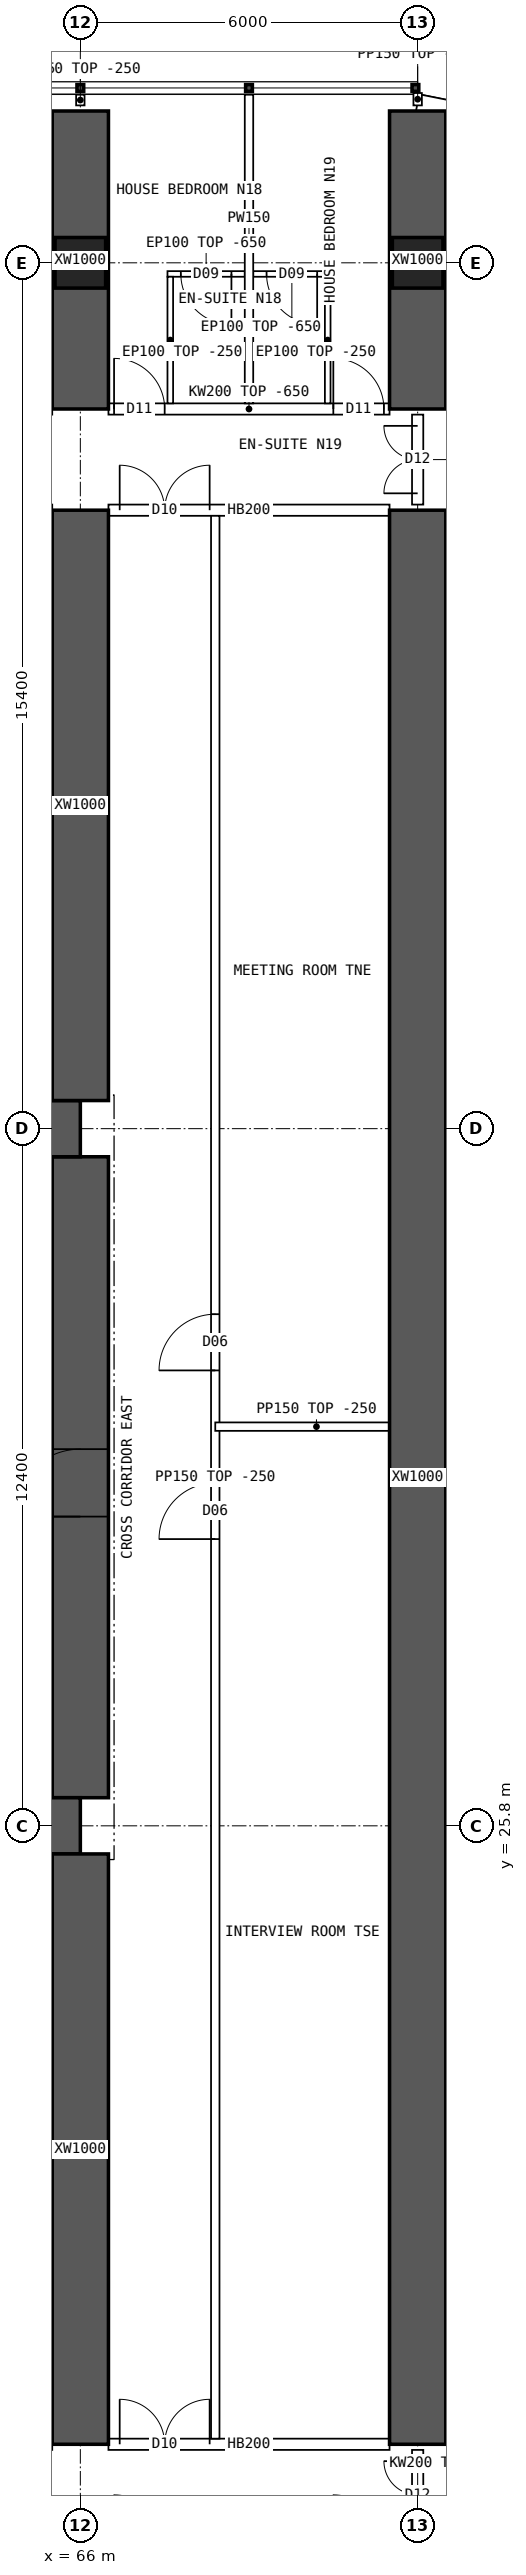
"""IFC4 building model, lengths in metres.
Left out: names, types, materials, properties, quantities, classifications, styles, units other than length and angle.
Written with IfcOpenShell. Run it as: python <this file> out.ifc"""

import sys

from ifc_helpers import new_model, si_unit, direction, frame, frame_2d, origin, origin_2d, place, context, subcontext, project, spatial, polyline, rectangle, hollow_rectangle, outline, extrude, element, fill, save


model = new_model("IFC4")
c1 = context("Model", 3, precision=1e-05, world=origin(), true_north=direction((0.0, 1.0)))
c2 = subcontext(c1, "Body", "Model", "MODEL_VIEW")
j1 = project(units=[si_unit("LENGTHUNIT", "METRE"), si_unit("PLANEANGLEUNIT", "RADIAN")], contexts=[c1])
p1 = place(None, origin())
s1 = spatial("IfcSite", under=j1, at=p1, CompositionType="ELEMENT")
p2 = place(p1, origin())
s2 = spatial("IfcBuilding", under=s1, at=p2, CompositionType="ELEMENT")
p3 = place(p2, frame((0.0, 0.0, 38.95)))
s3 = spatial("IfcBuildingStorey", under=s2, at=p3, CompositionType="ELEMENT", Elevation=38.95)
for number, where, z_axis, x_axis in (
    (1, (66.0, 53.6, 0.0), (0.0, 0.0, 1.0), (1.0, 0.0, 0.0)),
    (2, (72.0, 53.6, 0.0), (0.0, 0.0, 1.0), (1.0, 0.0, 0.0)),
):
    element("IfcColumn", number, at=place(p3, frame(where, z_axis=z_axis, x_axis=x_axis)), inside=s3, PredefinedType="COLUMN", context=c2, shape_type="SweptSolid", body=[
        extrude(hollow_rectangle(XDim=0.9, YDim=0.9, WallThickness=0.09, at=origin_2d()), origin(), (0.0, 0.0, 1.0), 3.75),
    ])
for number, where, z_axis, x_axis in (
    (3, (18.0, 25.8, 0.0), (0.0, 0.0, 1.0), (1.0, 0.0, 0.0)),
    (4, (18.0, 38.2, 0.0), (0.0, 0.0, 1.0), (1.0, 0.0, 0.0)),
):
    element("IfcWall", number, at=place(p3, frame(where, z_axis=z_axis, x_axis=x_axis)), inside=s3, PredefinedType="SHEAR", context=c2, shape_type="SweptSolid", body=[
        extrude(rectangle(XDim=48.0, YDim=1.0, at=frame_2d((24.0, 0.0))), origin(), (0.0, 0.0, 1.0), 3.75),
    ])
p4 = place(p3, frame((66.0, 26.3, 0.0), z_axis=(0.0, 0.0, 1.0), x_axis=(0.0, 1.0, 0.0)))
e5 = element("IfcWall", 5, at=p4, inside=s3, PredefinedType="SHEAR", context=c2, shape_type="SweptSolid", body=[
    extrude(rectangle(XDim=11.4, YDim=1.0, at=frame_2d((5.7, 0.0))), origin(), (0.0, 0.0, 1.0), 3.75),
])
p5 = place(p4, frame((5.0, 0.0, 0.0)))
e6 = element("IfcOpeningElement", 6, at=p5, cuts=e5, PredefinedType="OPENING", context=c2, shape_type="SweptSolid", body=[
    extrude(rectangle(XDim=1.2, YDim=2.1, at=frame_2d((0.6, 1.05))), frame((0.0, 0.51, 0.0), z_axis=(0.0, -1.0, 0.0), x_axis=(1.0, 0.0, 0.0)), (0.0, 0.0, 1.0), 1.02),
])
p6 = place(p3, frame((66.0, 51.0, 0.0), z_axis=(0.0, 0.0, 1.0), x_axis=(0.0, 1.0, 0.0)))
e7 = element("IfcWall", 7, at=p6, inside=s3, PredefinedType="SHEAR", context=c2, shape_type="SweptSolid", body=[
    extrude(rectangle(XDim=5.3, YDim=1.0, at=frame_2d((2.65, 0.0))), origin(), (0.0, 0.0, 1.0), 3.75),
])
for number, where, z_axis, x_axis in (
    (8, (66.0, 14.8, 0.0), (0.0, 0.0, 1.0), (0.0, 1.0, 0.0)),
    (9, (66.0, 38.7, 0.0), (0.0, 0.0, 1.0), (0.0, 1.0, 0.0)),
):
    element("IfcWall", number, at=place(p3, frame(where, z_axis=z_axis, x_axis=x_axis)), inside=s3, PredefinedType="SHEAR", context=c2, shape_type="SweptSolid", body=[
        extrude(rectangle(XDim=10.5, YDim=1.0, at=frame_2d((5.25, 0.0))), origin(), (0.0, 0.0, 1.0), 3.75),
    ])
p7 = place(p3, frame((72.0, 51.0, 0.0), z_axis=(0.0, 0.0, 1.0), x_axis=(0.0, 1.0, 0.0)))
e10 = element("IfcWall", 10, at=p7, inside=s3, PredefinedType="SHEAR", context=c2, shape_type="SweptSolid", body=[
    extrude(rectangle(XDim=5.3, YDim=1.0, at=frame_2d((2.65, 0.0))), origin(), (0.0, 0.0, 1.0), 3.75),
])
p8 = place(p3, frame((72.0, 14.8, 0.0), z_axis=(0.0, 0.0, 1.0), x_axis=(0.0, 1.0, 0.0)))
e11 = element("IfcWall", 11, at=p8, inside=s3, PredefinedType="SHEAR", context=c2, shape_type="SweptSolid", body=[
    extrude(rectangle(XDim=34.4, YDim=1.0, at=frame_2d((17.2, 0.0))), origin(), (0.0, 0.0, 1.0), 3.75),
])
p9 = place(p3, frame((75.157, 55.822, 0.0), z_axis=(0.0, 0.0, 1.0), x_axis=(-0.980787251524, 0.195080412259, 0.0)))
e12 = element("IfcWall", 12, at=p9, inside=s3, PredefinedType="SOLIDWALL", context=c2, shape_type="SweptSolid", body=[
    extrude(outline(polyline([(-0.03, -0.15), (3.249, -0.15), (3.189, 0.15), (0.03, 0.15), (-0.03, -0.15)])), origin(), (0.0, 0.0, 1.0), 3.5),
])
p10 = place(p9, frame((0.909, 0.0, 0.9)))
e13 = element("IfcOpeningElement", 13, at=p10, cuts=e12, PredefinedType="OPENING", context=c2, shape_type="SweptSolid", body=[
    extrude(rectangle(XDim=1.4, YDim=1.8, at=frame_2d((0.7, 0.9))), frame((0.0, 0.16, 0.0), z_axis=(0.0, -1.0, 0.0), x_axis=(1.0, 0.0, 0.0)), (0.0, 0.0, 1.0), 0.32),
])
p11 = place(p3, frame((66.5, 14.8, 0.0), z_axis=(0.0, 0.0, 1.0), x_axis=(1.0, 0.0, 0.0)))
e14 = element("IfcWall", 14, at=p11, inside=s3, PredefinedType="SOLIDWALL", context=c2, shape_type="SweptSolid", body=[
    extrude(rectangle(XDim=5.0, YDim=0.2, at=frame_2d((2.5, 0.0))), origin(), (0.0, 0.0, 1.0), 3.5),
])
p12 = place(p11, frame((0.2, 0.0, 0.0)))
e15 = element("IfcOpeningElement", 15, at=p12, cuts=e14, PredefinedType="OPENING", context=c2, shape_type="SweptSolid", body=[
    extrude(rectangle(XDim=1.6, YDim=2.1, at=frame_2d((0.8, 1.05))), frame((0.0, 0.11, 0.0), z_axis=(0.0, -1.0, 0.0), x_axis=(1.0, 0.0, 0.0)), (0.0, 0.0, 1.0), 0.22),
])
p13 = place(p3, frame((66.5, 51.0, 0.0), z_axis=(0.0, 0.0, 1.0), x_axis=(1.0, 0.0, 0.0)))
e16 = element("IfcWall", 16, at=p13, inside=s3, PredefinedType="SOLIDWALL", context=c2, shape_type="SweptSolid", body=[
    extrude(outline(polyline([(0.0, 0.0), (5.0, 0.0), (5.0, 3.1), (0.0, 3.1), (0.0, 0.0)])), frame((0.0, 0.1, 0.0), z_axis=(0.0, -1.0, 0.0), x_axis=(1.0, 0.0, 0.0)), (0.0, 0.0, 1.0), 0.2),
])
p14 = place(p13, frame((0.1, 0.0, 0.0)))
e17 = element("IfcOpeningElement", 17, at=p14, cuts=e16, PredefinedType="OPENING", context=c2, shape_type="SweptSolid", body=[
    extrude(rectangle(XDim=0.9, YDim=2.1, at=frame_2d((0.45, 1.05))), frame((0.0, 0.11, 0.0), z_axis=(0.0, -1.0, 0.0), x_axis=(1.0, 0.0, 0.0)), (0.0, 0.0, 1.0), 0.22),
])
p15 = place(p13, frame((4.0, 0.0, 0.0)))
e18 = element("IfcOpeningElement", 18, at=p15, cuts=e16, PredefinedType="OPENING", context=c2, shape_type="SweptSolid", body=[
    extrude(rectangle(XDim=0.9, YDim=2.1, at=frame_2d((0.45, 1.05))), frame((0.0, 0.11, 0.0), z_axis=(0.0, -1.0, 0.0), x_axis=(1.0, 0.0, 0.0)), (0.0, 0.0, 1.0), 0.22),
])
p16 = place(p3, frame((66.5, 49.2, 0.0), z_axis=(0.0, 0.0, 1.0), x_axis=(1.0, 0.0, 0.0)))
e19 = element("IfcWall", 19, at=p16, inside=s3, PredefinedType="SOLIDWALL", context=c2, shape_type="SweptSolid", body=[
    extrude(rectangle(XDim=5.0, YDim=0.2, at=frame_2d((2.5, 0.0))), origin(), (0.0, 0.0, 1.0), 3.5),
])
p17 = place(p16, frame((0.2, 0.0, 0.0)))
e20 = element("IfcOpeningElement", 20, at=p17, cuts=e19, PredefinedType="OPENING", context=c2, shape_type="SweptSolid", body=[
    extrude(rectangle(XDim=1.6, YDim=2.1, at=frame_2d((0.8, 1.05))), frame((0.0, 0.11, 0.0), z_axis=(0.0, -1.0, 0.0), x_axis=(1.0, 0.0, 0.0)), (0.0, 0.0, 1.0), 0.22),
])
p18 = place(p3, frame((69.0, 56.59, 0.0), z_axis=(0.0, 0.0, 1.0), x_axis=(0.0, -1.0, 0.0)))
e21 = element("IfcWall", 21, at=p18, inside=s3, PredefinedType="PARTITIONING", context=c2, shape_type="SweptSolid", body=[
    extrude(outline(polyline([(0.0, 0.0), (5.49, 0.0), (5.49, 3.1), (5.442, 3.1), (5.44, 3.5), (3.192, 3.5), (3.19, 3.1), (2.792, 3.1), (2.79, 3.5), (0.0, 3.5), (0.0, 0.0)])), frame((0.0, 0.075, 0.0), z_axis=(0.0, -1.0, 0.0), x_axis=(1.0, 0.0, 0.0)), (0.0, 0.0, 1.0), 0.15),
])
p19 = place(p3, frame((67.55, 53.402, 0.0), z_axis=(0.0, 0.0, 1.0), x_axis=(1.0, 0.0, 0.0)))
e22 = element("IfcWall", 22, at=p19, inside=s3, PredefinedType="PARTITIONING", context=c2, shape_type="SweptSolid", body=[
    extrude(outline(polyline([(0.0, 0.0), (1.375, 0.0), (1.375, 3.1), (0.0, 3.1), (0.0, 0.0)])), frame((0.0, 0.05, 0.0), z_axis=(0.0, -1.0, 0.0), x_axis=(1.0, 0.0, 0.0)), (0.0, 0.0, 1.0), 0.1),
])
p20 = place(p19, frame((0.238, 0.0, 0.0)))
e23 = element("IfcOpeningElement", 23, at=p20, cuts=e22, PredefinedType="OPENING", context=c2, shape_type="SweptSolid", body=[
    extrude(rectangle(XDim=0.9, YDim=2.1, at=frame_2d((0.45, 1.05))), frame((0.0, 0.06, 0.0), z_axis=(0.0, -1.0, 0.0), x_axis=(1.0, 0.0, 0.0)), (0.0, 0.0, 1.0), 0.12),
])
p21 = place(p3, frame((67.6, 53.352, 0.0), z_axis=(0.0, 0.0, 1.0), x_axis=(0.0, -1.0, 0.0)))
e24 = element("IfcWall", 24, at=p21, inside=s3, PredefinedType="PARTITIONING", context=c2, shape_type="SweptSolid", body=[
    extrude(outline(polyline([(0.0, 0.0), (2.252, 0.0), (2.252, 3.1), (2.204, 3.1), (2.202, 3.5), (0.0, 3.5), (0.0, 0.0)])), frame((0.0, 0.05, 0.0), z_axis=(0.0, -1.0, 0.0), x_axis=(1.0, 0.0, 0.0)), (0.0, 0.0, 1.0), 0.1),
])
p22 = place(p3, frame((69.075, 53.402, 0.0), z_axis=(0.0, 0.0, 1.0), x_axis=(1.0, 0.0, 0.0)))
e25 = element("IfcWall", 25, at=p22, inside=s3, PredefinedType="PARTITIONING", context=c2, shape_type="SweptSolid", body=[
    extrude(outline(polyline([(0.0, 0.0), (1.375, 0.0), (1.375, 3.1), (0.0, 3.1), (0.0, 0.0)])), frame((0.0, 0.05, 0.0), z_axis=(0.0, -1.0, 0.0), x_axis=(1.0, 0.0, 0.0)), (0.0, 0.0, 1.0), 0.1),
])
p23 = place(p22, frame((0.238, 0.0, 0.0)))
e26 = element("IfcOpeningElement", 26, at=p23, cuts=e25, PredefinedType="OPENING", context=c2, shape_type="SweptSolid", body=[
    extrude(rectangle(XDim=0.9, YDim=2.1, at=frame_2d((0.45, 1.05))), frame((0.0, 0.06, 0.0), z_axis=(0.0, -1.0, 0.0), x_axis=(1.0, 0.0, 0.0)), (0.0, 0.0, 1.0), 0.12),
])
p24 = place(p3, frame((70.4, 53.352, 0.0), z_axis=(0.0, 0.0, 1.0), x_axis=(0.0, -1.0, 0.0)))
e27 = element("IfcWall", 27, at=p24, inside=s3, PredefinedType="PARTITIONING", context=c2, shape_type="SweptSolid", body=[
    extrude(outline(polyline([(0.0, 0.0), (2.252, 0.0), (2.252, 3.1), (2.204, 3.1), (2.202, 3.5), (0.0, 3.5), (0.0, 0.0)])), frame((0.0, 0.05, 0.0), z_axis=(0.0, -1.0, 0.0), x_axis=(1.0, 0.0, 0.0)), (0.0, 0.0, 1.0), 0.1),
])
p25 = place(p3, frame((68.4, 14.9, 0.0), z_axis=(0.0, 0.0, 1.0), x_axis=(0.0, 1.0, 0.0)))
e28 = element("IfcWall", 28, at=p25, inside=s3, PredefinedType="PARTITIONING", context=c2, shape_type="SweptSolid", body=[
    extrude(rectangle(XDim=34.2, YDim=0.15, at=frame_2d((17.1, 0.0))), origin(), (0.0, 0.0, 1.0), 3.5),
])
p26 = place(p25, frame((16.0, 0.0, 0.0)))
e29 = element("IfcOpeningElement", 29, at=p26, cuts=e28, PredefinedType="OPENING", context=c2, shape_type="SweptSolid", body=[
    extrude(rectangle(XDim=1.0, YDim=2.1, at=frame_2d((0.5, 1.05))), frame((0.0, 0.085, 0.0), z_axis=(0.0, -1.0, 0.0), x_axis=(1.0, 0.0, 0.0)), (0.0, 0.0, 1.0), 0.17),
])
p27 = place(p25, frame((19.0, 0.0, 0.0)))
e30 = element("IfcOpeningElement", 30, at=p27, cuts=e28, PredefinedType="OPENING", context=c2, shape_type="SweptSolid", body=[
    extrude(rectangle(XDim=1.0, YDim=2.1, at=frame_2d((0.5, 1.05))), frame((0.0, 0.085, 0.0), z_axis=(0.0, -1.0, 0.0), x_axis=(1.0, 0.0, 0.0)), (0.0, 0.0, 1.0), 0.17),
])
p28 = place(p3, frame((68.4, 32.9, 0.0), z_axis=(0.0, 0.0, 1.0), x_axis=(1.0, 0.0, 0.0)))
e31 = element("IfcWall", 31, at=p28, inside=s3, PredefinedType="PARTITIONING", context=c2, shape_type="SweptSolid", body=[
    extrude(rectangle(XDim=3.6, YDim=0.15, at=frame_2d((1.8, 0.0))), origin(), (0.0, 0.0, 1.0), 3.5),
])
p29 = place(p3, frame((72.075, 30.85, 0.0), z_axis=(0.0, 0.0, 1.0), x_axis=(1.0, 0.0, 0.0)))
e32 = element("IfcWall", 32, at=p29, inside=s3, PredefinedType="PARTITIONING", context=c2, shape_type="SweptSolid", body=[
    extrude(outline(polyline([(0.0, 0.0), (8.02, 0.0), (8.02, 3.5), (6.227, 3.5), (6.225, 3.05), (5.627, 3.05), (5.625, 3.5), (0.0, 3.5), (0.0, 0.0)])), frame((0.0, 0.075, 0.0), z_axis=(0.0, -1.0, 0.0), x_axis=(1.0, 0.0, 0.0)), (0.0, 0.0, 1.0), 0.15),
])
p30 = place(p3, frame((72.0, 13.1, 0.0), z_axis=(0.0, 0.0, 1.0), x_axis=(0.0, 1.0, 0.0)))
e33 = element("IfcWall", 33, at=p30, inside=s3, PredefinedType="SOLIDWALL", context=c2, shape_type="SweptSolid", body=[
    extrude(outline(polyline([(0.0, 0.0), (1.6, 0.0), (1.6, 3.05), (0.0, 3.05), (0.0, 0.0)])), frame((0.0, 0.1, 0.0), z_axis=(0.0, -1.0, 0.0), x_axis=(1.0, 0.0, 0.0)), (0.0, 0.0, 1.0), 0.2),
])
p31 = place(p30, frame((0.2, 0.0, 0.0)))
e34 = element("IfcOpeningElement", 34, at=p31, cuts=e33, PredefinedType="OPENING", context=c2, shape_type="SweptSolid", body=[
    extrude(rectangle(XDim=1.2, YDim=2.1, at=frame_2d((0.6, 1.05))), frame((0.0, 0.11, 0.0), z_axis=(0.0, -1.0, 0.0), x_axis=(1.0, 0.0, 0.0)), (0.0, 0.0, 1.0), 0.22),
])
p32 = place(p3, frame((72.0, 49.3, 0.0), z_axis=(0.0, 0.0, 1.0), x_axis=(0.0, 1.0, 0.0)))
e35 = element("IfcWall", 35, at=p32, inside=s3, PredefinedType="SOLIDWALL", context=c2, shape_type="SweptSolid", body=[
    extrude(outline(polyline([(0.0, 0.0), (1.6, 0.0), (1.6, 3.05), (0.0, 3.05), (0.0, 0.0)])), frame((0.0, 0.1, 0.0), z_axis=(0.0, -1.0, 0.0), x_axis=(1.0, 0.0, 0.0)), (0.0, 0.0, 1.0), 0.2),
])
p33 = place(p32, frame((0.2, 0.0, 0.0)))
e36 = element("IfcOpeningElement", 36, at=p33, cuts=e35, PredefinedType="OPENING", context=c2, shape_type="SweptSolid", body=[
    extrude(rectangle(XDim=1.2, YDim=2.1, at=frame_2d((0.6, 1.05))), frame((0.0, 0.11, 0.0), z_axis=(0.0, -1.0, 0.0), x_axis=(1.0, 0.0, 0.0)), (0.0, 0.0, 1.0), 0.22),
])
p34 = place(p3, frame((66.0, 56.4, 0.0), z_axis=(0.0, 0.0, 1.0), x_axis=(0.0, 1.0, 0.0)))
e37 = element("IfcWall", 37, at=p34, inside=s3, PredefinedType="PARTITIONING", context=c2, shape_type="SweptSolid", body=[
    extrude(rectangle(XDim=0.19, YDim=0.15, at=frame_2d((0.095, 0.0))), origin(), (0.0, 0.0, 1.0), 3.5),
])
p35 = place(p3, frame((72.0, 56.4, 0.0), z_axis=(0.0, 0.0, 1.0), x_axis=(0.0, 1.0, 0.0)))
e38 = element("IfcWall", 38, at=p35, inside=s3, PredefinedType="PARTITIONING", context=c2, shape_type="SweptSolid", body=[
    extrude(rectangle(XDim=0.22, YDim=0.15, at=frame_2d((0.11, 0.0))), origin(), (0.0, 0.0, 1.0), 3.5),
])
p36 = place(p5, origin())
e39 = element("IfcDoor", 39, at=p36, inside=s3, OperationType="SINGLE_SWING_LEFT", PredefinedType="DOOR", context=c2, shape_type="SweptSolid", body=[
    extrude(rectangle(XDim=1.2, YDim=2.1, at=frame_2d((0.6, 1.05))), frame((0.0, 0.025, 0.0), z_axis=(0.0, -1.0, 0.0), x_axis=(1.0, 0.0, 0.0)), (0.0, 0.0, 1.0), 0.05),
])
fill(e6, e39)
p37 = place(p12, origin())
e40 = element("IfcDoor", 40, at=p37, inside=s3, OperationType="DOUBLE_DOOR_SINGLE_SWING", PredefinedType="DOOR", context=c2, shape_type="SweptSolid", body=[
    extrude(rectangle(XDim=1.6, YDim=2.1, at=frame_2d((0.8, 1.05))), frame((0.0, 0.025, 0.0), z_axis=(0.0, -1.0, 0.0), x_axis=(1.0, 0.0, 0.0)), (0.0, 0.0, 1.0), 0.05),
])
fill(e15, e40)
p38 = place(p17, origin())
e41 = element("IfcDoor", 41, at=p38, inside=s3, OperationType="DOUBLE_DOOR_SINGLE_SWING", PredefinedType="DOOR", context=c2, shape_type="SweptSolid", body=[
    extrude(rectangle(XDim=1.6, YDim=2.1, at=frame_2d((0.8, 1.05))), frame((0.0, 0.025, 0.0), z_axis=(0.0, -1.0, 0.0), x_axis=(1.0, 0.0, 0.0)), (0.0, 0.0, 1.0), 0.05),
])
fill(e20, e41)
p39 = place(p20, origin())
e42 = element("IfcDoor", 42, at=p39, inside=s3, OperationType="SINGLE_SWING_RIGHT", PredefinedType="DOOR", context=c2, shape_type="SweptSolid", body=[
    extrude(rectangle(XDim=0.9, YDim=2.1, at=frame_2d((0.45, 1.05))), frame((0.0, 0.025, 0.0), z_axis=(0.0, -1.0, 0.0), x_axis=(1.0, 0.0, 0.0)), (0.0, 0.0, 1.0), 0.05),
])
fill(e23, e42)
p40 = place(p14, origin())
e43 = element("IfcDoor", 43, at=p40, inside=s3, OperationType="SINGLE_SWING_LEFT", PredefinedType="DOOR", context=c2, shape_type="SweptSolid", body=[
    extrude(rectangle(XDim=0.9, YDim=2.1, at=frame_2d((0.45, 1.05))), frame((0.0, 0.025, 0.0), z_axis=(0.0, -1.0, 0.0), x_axis=(1.0, 0.0, 0.0)), (0.0, 0.0, 1.0), 0.05),
])
fill(e17, e43)
p41 = place(p23, origin())
e44 = element("IfcDoor", 44, at=p41, inside=s3, OperationType="SINGLE_SWING_RIGHT", PredefinedType="DOOR", context=c2, shape_type="SweptSolid", body=[
    extrude(rectangle(XDim=0.9, YDim=2.1, at=frame_2d((0.45, 1.05))), frame((0.0, 0.025, 0.0), z_axis=(0.0, -1.0, 0.0), x_axis=(1.0, 0.0, 0.0)), (0.0, 0.0, 1.0), 0.05),
])
fill(e26, e44)
p42 = place(p15, origin())
e45 = element("IfcDoor", 45, at=p42, inside=s3, OperationType="SINGLE_SWING_LEFT", PredefinedType="DOOR", context=c2, shape_type="SweptSolid", body=[
    extrude(rectangle(XDim=0.9, YDim=2.1, at=frame_2d((0.45, 1.05))), frame((0.0, 0.025, 0.0), z_axis=(0.0, -1.0, 0.0), x_axis=(1.0, 0.0, 0.0)), (0.0, 0.0, 1.0), 0.05),
])
fill(e18, e45)
p43 = place(p26, origin())
e46 = element("IfcDoor", 46, at=p43, inside=s3, OperationType="SINGLE_SWING_LEFT", PredefinedType="DOOR", context=c2, shape_type="SweptSolid", body=[
    extrude(rectangle(XDim=1.0, YDim=2.1, at=frame_2d((0.5, 1.05))), frame((0.0, 0.025, 0.0), z_axis=(0.0, -1.0, 0.0), x_axis=(1.0, 0.0, 0.0)), (0.0, 0.0, 1.0), 0.05),
])
fill(e29, e46)
p44 = place(p27, origin())
e47 = element("IfcDoor", 47, at=p44, inside=s3, OperationType="SINGLE_SWING_LEFT", PredefinedType="DOOR", context=c2, shape_type="SweptSolid", body=[
    extrude(rectangle(XDim=1.0, YDim=2.1, at=frame_2d((0.5, 1.05))), frame((0.0, 0.025, 0.0), z_axis=(0.0, -1.0, 0.0), x_axis=(1.0, 0.0, 0.0)), (0.0, 0.0, 1.0), 0.05),
])
fill(e30, e47)
p45 = place(p31, origin())
e48 = element("IfcDoor", 48, at=p45, inside=s3, OperationType="DOUBLE_DOOR_SINGLE_SWING", PredefinedType="DOOR", context=c2, shape_type="SweptSolid", body=[
    extrude(rectangle(XDim=1.2, YDim=2.1, at=frame_2d((0.6, 1.05))), frame((0.0, 0.025, 0.0), z_axis=(0.0, -1.0, 0.0), x_axis=(1.0, 0.0, 0.0)), (0.0, 0.0, 1.0), 0.05),
])
fill(e34, e48)
p46 = place(p33, origin())
e49 = element("IfcDoor", 49, at=p46, inside=s3, OperationType="DOUBLE_DOOR_SINGLE_SWING", PredefinedType="DOOR", context=c2, shape_type="SweptSolid", body=[
    extrude(rectangle(XDim=1.2, YDim=2.1, at=frame_2d((0.6, 1.05))), frame((0.0, 0.025, 0.0), z_axis=(0.0, -1.0, 0.0), x_axis=(1.0, 0.0, 0.0)), (0.0, 0.0, 1.0), 0.05),
])
fill(e36, e49)
save(model, sys.argv[1])
